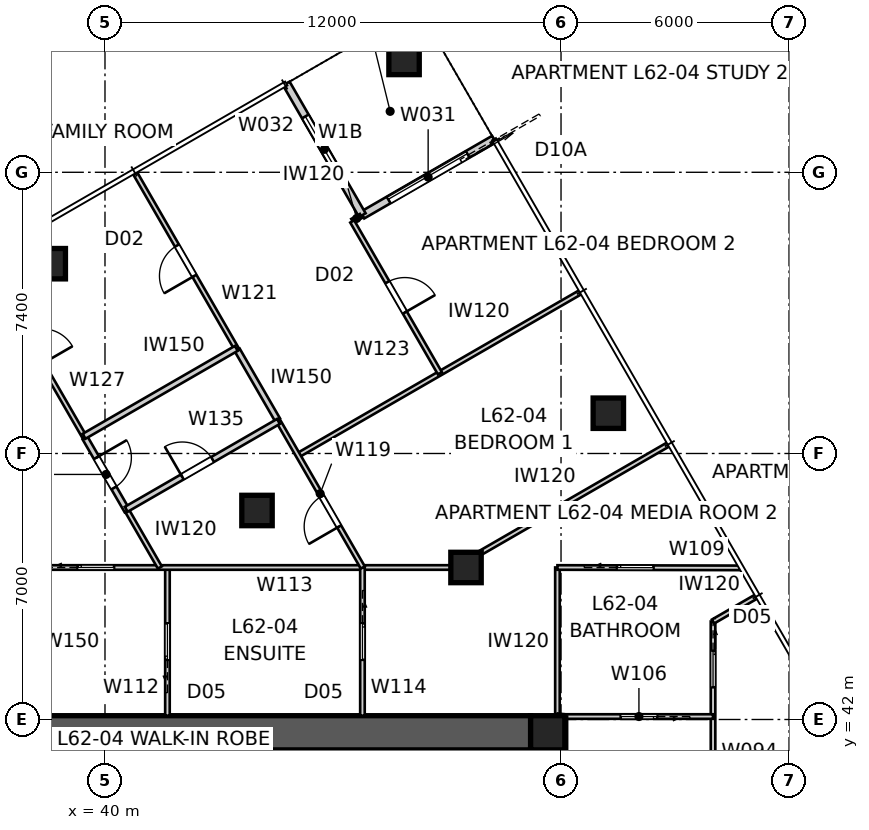
"""IFC4 building model, lengths in metres.
Left out: names, types, materials, properties, quantities, classifications, styles, units other than length and angle.
Written with IfcOpenShell. Run it as: python <this file> out.ifc"""

import sys

from ifc_helpers import new_model, si_unit, direction, frame, frame_2d, origin, origin_2d, place, context, subcontext, project, spatial, polyline, rectangle, outline, extrude, element, fill, save


model = new_model("IFC4")
c1 = context("Model", 3, precision=1e-05, world=origin(), true_north=direction((0.0, 1.0)))
c2 = subcontext(c1, "Body", "Model", "MODEL_VIEW")
j1 = project(units=[si_unit("LENGTHUNIT", "METRE"), si_unit("PLANEANGLEUNIT", "RADIAN")], contexts=[c1])
p1 = place(None, origin())
s1 = spatial("IfcSite", under=j1, at=p1, CompositionType="ELEMENT")
p2 = place(p1, origin())
s2 = spatial("IfcBuilding", under=s1, at=p2, CompositionType="ELEMENT")
p3 = place(p2, frame((0.0, 0.0, 225.2)))
s3 = spatial("IfcBuildingStorey", under=s2, at=p3, CompositionType="ELEMENT", Elevation=225.2)
p4 = place(p3, frame((28.8, 41.65, 0.0), z_axis=(0.0, 0.0, 1.0), x_axis=(1.0, 0.0, 0.0)))
e1 = element("IfcWall", 1, at=p4, inside=s3, PredefinedType="SHEAR", context=c2, shape_type="SweptSolid", body=[
    extrude(outline(polyline([(0.0, -0.45), (22.4, -0.45), (22.4, -0.025), (22.85, -0.025), (22.85, 0.025), (22.4, 0.025), (22.4, 0.45), (0.0, 0.45), (0.0, 0.025), (-0.45, 0.025), (-0.45, -0.025), (0.0, -0.025), (0.0, -0.45)])), origin(), (0.0, 0.0, 1.0), 3.4),
])
p5 = place(p3, frame((51.65, 18.8, 0.0), z_axis=(0.0, 0.0, 1.0), x_axis=(0.0, 1.0, 0.0)))
e2 = element("IfcWall", 2, at=p5, inside=s3, PredefinedType="SHEAR", context=c2, shape_type="SweptSolid", body=[
    extrude(outline(polyline([(0.0, -0.45), (22.4, -0.45), (22.4, -0.025), (22.85, -0.025), (22.85, 0.025), (22.4, 0.025), (22.4, 0.45), (0.0, 0.45), (0.0, 0.025), (-0.45, 0.025), (-0.45, -0.025), (0.0, -0.025), (0.0, -0.45)])), origin(), (0.0, 0.0, 1.0), 3.4),
])
p6 = place(p5, frame((11.14, 0.0, 0.0)))
e3 = element("IfcOpeningElement", 3, at=p6, cuts=e2, PredefinedType="OPENING", context=c2, shape_type="SweptSolid", body=[
    extrude(rectangle(XDim=1.02, YDim=2.4, at=frame_2d((0.51, 1.2))), frame((0.0, 0.46, 0.0), z_axis=(0.0, -1.0, 0.0), x_axis=(1.0, 0.0, 0.0)), (0.0, 0.0, 1.0), 0.92),
])
p7 = place(p3, frame((51.65, 41.65, 0.0), z_axis=(0.0, 0.0, 1.0), x_axis=(1.0, 0.0, 0.0)))
e4 = element("IfcColumn", 4, at=p7, inside=s3, PredefinedType="COLUMN", context=c2, shape_type="SweptSolid", body=[
    extrude(rectangle(XDim=0.9, YDim=0.9, at=origin_2d()), origin(), (0.0, 0.0, 1.0), 3.4),
])
for number, where, z_axis, x_axis in (
    (5, (53.245, 50.06, 0.0), (0.0, 0.0, 1.0), (1.0, 0.0, 0.0)),
    (6, (47.87, 59.37, 0.0), (0.0, 0.0, 1.0), (1.0, 0.0, 0.0)),
    (7, (38.56, 53.995, 0.0), (0.0, 0.0, 1.0), (1.0, 0.0, 0.0)),
    (8, (49.5, 46.0, 0.0), (0.0, 0.0, 1.0), (1.0, 0.0, 0.0)),
    (9, (44.0, 47.5, 0.0), (0.0, 0.0, 1.0), (1.0, 0.0, 0.0)),
):
    element("IfcColumn", number, at=place(p3, frame(where, z_axis=z_axis, x_axis=x_axis)), inside=s3, PredefinedType="COLUMN", context=c2, shape_type="SweptSolid", body=[
        extrude(rectangle(XDim=0.8, YDim=0.8, at=origin_2d()), origin(), (0.0, 0.0, 1.0), 3.4),
    ])
p8 = place(p3, frame((50.236, 57.271, 0.0), z_axis=(0.0, 0.0, 1.0), x_axis=(-0.866026010844, -0.49999894854, 0.0)))
e10 = element("IfcWall", 10, at=p8, inside=s3, PredefinedType="SOLIDWALL", context=c2, shape_type="SweptSolid", body=[
    extrude(rectangle(XDim=4.0, YDim=0.2, at=frame_2d((2.0, 0.0))), origin(), (0.0, 0.0, 1.0), 3.25),
])
p9 = place(p8, frame((0.8, 0.0, 0.0)))
e11 = element("IfcOpeningElement", 11, at=p9, cuts=e10, PredefinedType="OPENING", context=c2, shape_type="SweptSolid", body=[
    extrude(rectangle(XDim=2.4, YDim=2.1, at=frame_2d((1.2, 1.05))), frame((0.0, 0.11, 0.0), z_axis=(0.0, -1.0, 0.0), x_axis=(1.0, 0.0, 0.0)), (0.0, 0.0, 1.0), 0.22),
])
p10 = place(p3, frame((46.771, 55.271, 0.0), z_axis=(0.0, 0.0, 1.0), x_axis=(-0.49999894854, 0.866026010844, 0.0)))
e12 = element("IfcWall", 12, at=p10, inside=s3, PredefinedType="SOLIDWALL", context=c2, shape_type="SweptSolid", body=[
    extrude(rectangle(XDim=4.0, YDim=0.2, at=frame_2d((2.0, 0.0))), origin(), (0.0, 0.0, 1.0), 3.25),
])
p11 = place(p10, frame((1.0, 0.0, 0.45)))
e13 = element("IfcOpeningElement", 13, at=p11, cuts=e12, PredefinedType="OPENING", context=c2, shape_type="SweptSolid", body=[
    extrude(rectangle(XDim=2.0, YDim=1.8, at=frame_2d((1.0, 0.9))), frame((0.0, 0.11, 0.0), z_axis=(0.0, -1.0, 0.0), x_axis=(1.0, 0.0, 0.0)), (0.0, 0.0, 1.0), 0.22),
])
p12 = place(p3, frame((59.486, 41.25, 0.0), z_axis=(0.0, 0.0, 1.0), x_axis=(-0.866020489494, -0.500008511703, 0.0)))
e14 = element("IfcWall", 14, at=p12, inside=s3, PredefinedType="PARTITIONING", context=c2, shape_type="SweptSolid", body=[
    extrude(rectangle(XDim=8.496, YDim=0.25, at=frame_2d((4.248, 0.0))), origin(), (0.0, 0.0, 1.0), 3.25),
])
p13 = place(p3, frame((47.6, 41.2, 0.0), z_axis=(0.0, 0.0, 1.0), x_axis=(0.0, -1.0, 0.0)))
e15 = element("IfcWall", 15, at=p13, inside=s3, PredefinedType="SOLIDWALL", context=c2, shape_type="SweptSolid", body=[
    extrude(rectangle(XDim=5.9, YDim=0.15, at=frame_2d((2.95, 0.0))), origin(), (0.0, 0.0, 1.0), 3.25),
])
p14 = place(p3, frame((56.0, 44.578, 0.0), z_axis=(0.0, 0.0, 1.0), x_axis=(0.0, -1.0, 0.0)))
e16 = element("IfcWall", 16, at=p14, inside=s3, PredefinedType="PARTITIONING", context=c2, shape_type="SweptSolid", body=[
    extrude(rectangle(XDim=10.681, YDim=0.12, at=frame_2d((5.34, 0.0))), origin(), (0.0, 0.0, 1.0), 2.55),
])
p15 = place(p14, frame((0.77, 0.0, 0.0)))
e17 = element("IfcOpeningElement", 17, at=p15, cuts=e16, PredefinedType="OPENING", context=c2, shape_type="SweptSolid", body=[
    extrude(rectangle(XDim=0.96, YDim=2.1, at=frame_2d((0.48, 1.05))), frame((0.0, 0.07, 0.0), z_axis=(0.0, -1.0, 0.0), x_axis=(1.0, 0.0, 0.0)), (0.0, 0.0, 1.0), 0.14),
])
p16 = place(p14, frame((7.379, 0.0, 0.0)))
e18 = element("IfcOpeningElement", 18, at=p16, cuts=e16, PredefinedType="OPENING", context=c2, shape_type="SweptSolid", body=[
    extrude(rectangle(XDim=0.96, YDim=2.1, at=frame_2d((0.48, 1.05))), frame((0.0, 0.07, 0.0), z_axis=(0.0, -1.0, 0.0), x_axis=(1.0, 0.0, 0.0)), (0.0, 0.0, 1.0), 0.14),
])
p17 = place(p3, frame((56.0, 42.078, 0.0), z_axis=(0.0, 0.0, 1.0), x_axis=(-1.0, 0.0, 0.0)))
e19 = element("IfcWall", 19, at=p17, inside=s3, PredefinedType="PARTITIONING", context=c2, shape_type="SweptSolid", body=[
    extrude(rectangle(XDim=3.9, YDim=0.12, at=frame_2d((1.95, 0.0))), origin(), (0.0, 0.0, 1.0), 3.25),
])
p18 = place(p17, frame((1.47, 0.0, 0.0)))
e20 = element("IfcOpeningElement", 20, at=p18, cuts=e19, PredefinedType="OPENING", context=c2, shape_type="SweptSolid", body=[
    extrude(rectangle(XDim=0.96, YDim=2.1, at=frame_2d((0.48, 1.05))), frame((0.0, 0.07, 0.0), z_axis=(0.0, -1.0, 0.0), x_axis=(1.0, 0.0, 0.0)), (0.0, 0.0, 1.0), 0.14),
])
p19 = place(p3, frame((51.906, 42.1, 0.0), z_axis=(0.0, 0.0, 1.0), x_axis=(0.0, 1.0, 0.0)))
e21 = element("IfcWall", 21, at=p19, inside=s3, PredefinedType="PARTITIONING", context=c2, shape_type="SweptSolid", body=[
    extrude(rectangle(XDim=3.9, YDim=0.12, at=frame_2d((1.95, 0.0))), origin(), (0.0, 0.0, 1.0), 3.25),
])
p20 = place(p3, frame((51.906, 46.0, 0.0), z_axis=(0.0, 0.0, 1.0), x_axis=(0.999997822794, -0.002086721841, 0.0)))
e22 = element("IfcWall", 22, at=p20, inside=s3, PredefinedType="PARTITIONING", context=c2, shape_type="SweptSolid", body=[
    extrude(rectangle(XDim=4.797, YDim=0.12, at=frame_2d((2.398, 0.0))), origin(), (0.0, 0.0, 1.0), 3.25),
])
p21 = place(p20, frame((1.567, 0.0, 0.0)))
e23 = element("IfcOpeningElement", 23, at=p21, cuts=e22, PredefinedType="OPENING", context=c2, shape_type="SweptSolid", body=[
    extrude(rectangle(XDim=0.96, YDim=2.1, at=frame_2d((0.48, 1.05))), frame((0.0, 0.07, 0.0), z_axis=(0.0, -1.0, 0.0), x_axis=(1.0, 0.0, 0.0)), (0.0, 0.0, 1.0), 0.14),
])
p22 = place(p3, frame((57.138, 45.235, 0.0), z_axis=(0.0, 0.0, 1.0), x_axis=(-0.866040225545, -0.499974327079, 0.0)))
e24 = element("IfcWall", 24, at=p22, inside=s3, PredefinedType="PARTITIONING", context=c2, shape_type="SweptSolid", body=[
    extrude(rectangle(XDim=1.314, YDim=0.12, at=frame_2d((0.657, 0.0))), origin(), (0.0, 0.0, 1.0), 3.25),
])
p23 = place(p3, frame((52.1, 41.18, 0.0), z_axis=(0.0, 0.0, 1.0), x_axis=(0.0, 1.0, 0.0)))
e25 = element("IfcWall", 25, at=p23, inside=s3, PredefinedType="PARTITIONING", context=c2, shape_type="SweptSolid", body=[
    extrude(rectangle(XDim=0.898, YDim=0.12, at=frame_2d((0.449, 0.0))), origin(), (0.0, 0.0, 1.0), 3.25),
])
p24 = place(p3, frame((41.644, 42.1, 0.0), z_axis=(0.0, 0.0, 1.0), x_axis=(0.0, 1.0, 0.0)))
e26 = element("IfcWall", 26, at=p24, inside=s3, PredefinedType="PARTITIONING", context=c2, shape_type="SweptSolid", body=[
    extrude(rectangle(XDim=3.9, YDim=0.12, at=frame_2d((1.95, 0.0))), origin(), (0.0, 0.0, 1.0), 3.25),
])
p25 = place(p24, frame((1.47, 0.0, 0.0)))
e27 = element("IfcOpeningElement", 27, at=p25, cuts=e26, PredefinedType="OPENING", context=c2, shape_type="SweptSolid", body=[
    extrude(rectangle(XDim=0.96, YDim=2.1, at=frame_2d((0.48, 1.05))), frame((0.0, 0.07, 0.0), z_axis=(0.0, -1.0, 0.0), x_axis=(1.0, 0.0, 0.0)), (0.0, 0.0, 1.0), 0.14),
])
p26 = place(p3, frame((38.017, 46.0, 0.0), z_axis=(0.0, 0.0, 1.0), x_axis=(1.0, 0.0, 0.0)))
e28 = element("IfcWall", 28, at=p26, inside=s3, PredefinedType="PARTITIONING", context=c2, shape_type="SweptSolid", body=[
    extrude(rectangle(XDim=11.196, YDim=0.12, at=frame_2d((5.598, 0.0))), origin(), (0.0, 0.0, 1.0), 3.25),
])
p27 = place(p26, frame((1.262, 0.0, 0.0)))
e29 = element("IfcOpeningElement", 29, at=p27, cuts=e28, PredefinedType="OPENING", context=c2, shape_type="SweptSolid", body=[
    extrude(rectangle(XDim=0.96, YDim=2.1, at=frame_2d((0.48, 1.05))), frame((0.0, 0.07, 0.0), z_axis=(0.0, -1.0, 0.0), x_axis=(1.0, 0.0, 0.0)), (0.0, 0.0, 1.0), 0.14),
])
p28 = place(p3, frame((46.775, 46.0, 0.0), z_axis=(0.0, 0.0, 1.0), x_axis=(0.0, -1.0, 0.0)))
e30 = element("IfcWall", 30, at=p28, inside=s3, PredefinedType="PARTITIONING", context=c2, shape_type="SweptSolid", body=[
    extrude(rectangle(XDim=3.9, YDim=0.12, at=frame_2d((1.95, 0.0))), origin(), (0.0, 0.0, 1.0), 3.25),
])
p29 = place(p28, frame((1.47, 0.0, 0.0)))
e31 = element("IfcOpeningElement", 31, at=p29, cuts=e30, PredefinedType="OPENING", context=c2, shape_type="SweptSolid", body=[
    extrude(rectangle(XDim=0.96, YDim=2.1, at=frame_2d((0.48, 1.05))), frame((0.0, 0.07, 0.0), z_axis=(0.0, -1.0, 0.0), x_axis=(1.0, 0.0, 0.0)), (0.0, 0.0, 1.0), 0.14),
])
p30 = place(p3, frame((45.079, 48.954, 0.0), z_axis=(0.0, 0.0, 1.0), x_axis=(0.866025991751, 0.49999898161, 0.0)))
e32 = element("IfcWall", 32, at=p30, inside=s3, PredefinedType="PARTITIONING", context=c2, shape_type="SweptSolid", body=[
    extrude(rectangle(XDim=8.585, YDim=0.12, at=frame_2d((4.292, 0.0))), origin(), (0.0, 0.0, 1.0), 3.25),
])
p31 = place(p3, frame((46.784, 46.0, 0.0), z_axis=(0.0, 0.0, 1.0), x_axis=(-0.500017500808, 0.866015299452, 0.0)))
e33 = element("IfcWall", 33, at=p31, inside=s3, PredefinedType="PARTITIONING", context=c2, shape_type="SweptSolid", body=[
    extrude(rectangle(XDim=4.489, YDim=0.12, at=frame_2d((2.244, 0.0))), origin(), (0.0, 0.0, 1.0), 3.25),
])
p32 = place(p31, frame((1.245, 0.0, 0.0)))
e34 = element("IfcOpeningElement", 34, at=p32, cuts=e33, PredefinedType="OPENING", context=c2, shape_type="SweptSolid", body=[
    extrude(rectangle(XDim=0.92, YDim=2.34, at=frame_2d((0.46, 1.17))), frame((0.0, 0.07, 0.0), z_axis=(0.0, -1.0, 0.0), x_axis=(1.0, 0.0, 0.0)), (0.0, 0.0, 1.0), 0.14),
])
p33 = place(p3, frame((54.826, 49.241, 0.0), z_axis=(0.0, 0.0, 1.0), x_axis=(-0.866023120914, -0.500003954026, 0.0)))
e35 = element("IfcWall", 35, at=p33, inside=s3, PredefinedType="PARTITIONING", context=c2, shape_type="SweptSolid", body=[
    extrude(rectangle(XDim=6.481, YDim=0.12, at=frame_2d((3.241, 0.0))), origin(), (0.0, 0.0, 1.0), 3.25),
])
p34 = place(p3, frame((43.48, 51.722, 0.0), z_axis=(0.0, 0.0, 1.0), x_axis=(-0.499989180974, 0.866031650062, 0.0)))
e36 = element("IfcWall", 36, at=p34, inside=s3, PredefinedType="PARTITIONING", context=c2, shape_type="SweptSolid", body=[
    extrude(rectangle(XDim=5.388, YDim=0.12, at=frame_2d((2.694, 0.0))), origin(), (0.0, 0.0, 1.0), 3.25),
])
p35 = place(p34, frame((2.254, 0.0, 0.0)))
e37 = element("IfcOpeningElement", 37, at=p35, cuts=e36, PredefinedType="OPENING", context=c2, shape_type="SweptSolid", body=[
    extrude(rectangle(XDim=0.92, YDim=2.34, at=frame_2d((0.46, 1.17))), frame((0.0, 0.07, 0.0), z_axis=(0.0, -1.0, 0.0), x_axis=(1.0, 0.0, 0.0)), (0.0, 0.0, 1.0), 0.14),
])
p36 = place(p3, frame((46.737, 55.251, 0.0), z_axis=(0.0, 0.0, 1.0), x_axis=(-0.865829262097, -0.500339573586, 0.0)))
e38 = element("IfcWall", 38, at=p36, inside=s3, PredefinedType="PARTITIONING", context=c2, shape_type="SweptSolid", body=[
    extrude(rectangle(XDim=0.262, YDim=0.12, at=frame_2d((0.131, 0.0))), origin(), (0.0, 0.0, 1.0), 3.25),
])
p37 = place(p3, frame((46.506, 55.107, 0.0), z_axis=(0.0, 0.0, 1.0), x_axis=(0.49996820914, -0.866043757468, 0.0)))
e39 = element("IfcWall", 39, at=p37, inside=s3, PredefinedType="PARTITIONING", context=c2, shape_type="SweptSolid", body=[
    extrude(rectangle(XDim=4.615, YDim=0.12, at=frame_2d((2.308, 0.0))), origin(), (0.0, 0.0, 1.0), 3.25),
])
p38 = place(p37, frame((1.847, 0.0, 0.0)))
e40 = element("IfcOpeningElement", 40, at=p38, cuts=e39, PredefinedType="OPENING", context=c2, shape_type="SweptSolid", body=[
    extrude(rectangle(XDim=0.92, YDim=2.34, at=frame_2d((0.46, 1.17))), frame((0.0, 0.07, 0.0), z_axis=(0.0, -1.0, 0.0), x_axis=(1.0, 0.0, 0.0)), (0.0, 0.0, 1.0), 0.14),
])
p39 = place(p3, frame((44.54, 49.887, 0.0), z_axis=(0.0, 0.0, 1.0), x_axis=(-0.500005013853, 0.866022509016, 0.0)))
e41 = element("IfcWall", 41, at=p39, inside=s3, PredefinedType="SOLIDWALL", context=c2, shape_type="SweptSolid", body=[
    extrude(rectangle(XDim=2.119, YDim=0.15, at=frame_2d((1.06, 0.0))), origin(), (0.0, 0.0, 1.0), 3.25),
])
p40 = place(p3, frame((36.781, 54.076, 0.0), z_axis=(0.0, 0.0, 1.0), x_axis=(0.499989180974, -0.866031650062, 0.0)))
e42 = element("IfcWall", 42, at=p40, inside=s3, PredefinedType="PARTITIONING", context=c2, shape_type="SweptSolid", body=[
    extrude(rectangle(XDim=5.388, YDim=0.12, at=frame_2d((2.694, 0.0))), origin(), (0.0, 0.0, 1.0), 3.25),
])
p41 = place(p40, frame((2.214, 0.0, 0.0)))
e43 = element("IfcOpeningElement", 43, at=p41, cuts=e42, PredefinedType="OPENING", context=c2, shape_type="SweptSolid", body=[
    extrude(rectangle(XDim=0.92, YDim=2.34, at=frame_2d((0.46, 1.17))), frame((0.0, 0.07, 0.0), z_axis=(0.0, -1.0, 0.0), x_axis=(1.0, 0.0, 0.0)), (0.0, 0.0, 1.0), 0.14),
])
p42 = place(p3, frame((40.584, 47.488, 0.0), z_axis=(0.0, 0.0, 1.0), x_axis=(0.500005339912, -0.866022320763, 0.0)))
e44 = element("IfcWall", 44, at=p42, inside=s3, PredefinedType="PARTITIONING", context=c2, shape_type="SweptSolid", body=[
    extrude(rectangle(XDim=1.718, YDim=0.12, at=frame_2d((0.859, 0.0))), origin(), (0.0, 0.0, 1.0), 3.25),
])
p43 = place(p3, frame((39.475, 49.41, 0.0), z_axis=(0.0, 0.0, 1.0), x_axis=(0.500008142102, -0.866020702889, 0.0)))
e45 = element("IfcWall", 45, at=p43, inside=s3, PredefinedType="SOLIDWALL", context=c2, shape_type="SweptSolid", body=[
    extrude(rectangle(XDim=2.219, YDim=0.15, at=frame_2d((1.11, 0.0))), origin(), (0.0, 0.0, 1.0), 3.25),
])
p44 = place(p43, frame((0.6, 0.0, 0.0)))
e46 = element("IfcOpeningElement", 46, at=p44, cuts=e45, PredefinedType="OPENING", context=c2, shape_type="SweptSolid", body=[
    extrude(rectangle(XDim=0.92, YDim=2.34, at=frame_2d((0.46, 1.17))), frame((0.0, 0.085, 0.0), z_axis=(0.0, -1.0, 0.0), x_axis=(1.0, 0.0, 0.0)), (0.0, 0.0, 1.0), 0.17),
])
p45 = place(p3, frame((43.455, 51.766, 0.0), z_axis=(0.0, 0.0, 1.0), x_axis=(-0.866025598446, -0.499999662836, 0.0)))
e47 = element("IfcWall", 47, at=p45, inside=s3, PredefinedType="SOLIDWALL", context=c2, shape_type="SweptSolid", body=[
    extrude(rectangle(XDim=4.625, YDim=0.15, at=frame_2d((2.312, 0.0))), origin(), (0.0, 0.0, 1.0), 3.25),
])
p46 = place(p3, frame((40.559, 47.531, 0.0), z_axis=(0.0, 0.0, 1.0), x_axis=(0.866025598446, 0.499999662836, 0.0)))
e48 = element("IfcWall", 48, at=p46, inside=s3, PredefinedType="SOLIDWALL", context=c2, shape_type="SweptSolid", body=[
    extrude(rectangle(XDim=4.625, YDim=0.15, at=frame_2d((2.312, 0.0))), origin(), (0.0, 0.0, 1.0), 3.25),
])
p47 = place(p46, frame((1.702, 0.0, 0.0)))
e49 = element("IfcOpeningElement", 49, at=p47, cuts=e48, PredefinedType="OPENING", context=c2, shape_type="SweptSolid", body=[
    extrude(rectangle(XDim=0.92, YDim=2.34, at=frame_2d((0.46, 1.17))), frame((0.0, 0.085, 0.0), z_axis=(0.0, -1.0, 0.0), x_axis=(1.0, 0.0, 0.0)), (0.0, 0.0, 1.0), 0.17),
])
p48 = place(p3, frame((51.906, 42.1, 0.0), z_axis=(0.0, 0.0, 1.0), x_axis=(0.993387055489, -0.114813579278, 0.0)))
e50 = element("IfcWall", 50, at=p48, inside=s3, PredefinedType="PARTITIONING", context=c2, shape_type="SweptSolid", body=[
    extrude(rectangle(XDim=0.196, YDim=0.12, at=frame_2d((0.098, 0.0))), origin(), (0.0, 0.0, 1.0), 3.25),
])
p49 = place(p9, origin())
e51 = element("IfcDoor", 51, at=p49, inside=s3, OperationType="SLIDING_TO_LEFT", PredefinedType="DOOR", context=c2, shape_type="SweptSolid", body=[
    extrude(rectangle(XDim=2.4, YDim=2.1, at=frame_2d((1.2, 1.05))), frame((0.0, 0.025, 0.0), z_axis=(0.0, -1.0, 0.0), x_axis=(1.0, 0.0, 0.0)), (0.0, 0.0, 1.0), 0.05),
])
fill(e11, e51)
p50 = place(p11, origin())
e52 = element("IfcWindow", 52, at=p50, inside=s3, PartitioningType="SINGLE_PANEL", PredefinedType="WINDOW", context=c2, shape_type="SweptSolid", body=[
    extrude(rectangle(XDim=2.0, YDim=1.8, at=frame_2d((1.0, 0.9))), frame((0.0, 0.03, 0.0), z_axis=(0.0, -1.0, 0.0), x_axis=(1.0, 0.0, 0.0)), (0.0, 0.0, 1.0), 0.06),
])
fill(e13, e52)
p51 = place(p27, origin())
e53 = element("IfcDoor", 53, at=p51, inside=s3, OperationType="SLIDING_TO_LEFT", PredefinedType="DOOR", context=c2, shape_type="SweptSolid", body=[
    extrude(rectangle(XDim=0.96, YDim=2.1, at=frame_2d((0.48, 1.05))), frame((0.0, 0.025, 0.0), z_axis=(0.0, -1.0, 0.0), x_axis=(1.0, 0.0, 0.0)), (0.0, 0.0, 1.0), 0.05),
])
fill(e29, e53)
p52 = place(p44, origin())
e54 = element("IfcDoor", 54, at=p52, inside=s3, OperationType="SINGLE_SWING_LEFT", PredefinedType="DOOR", context=c2, shape_type="SweptSolid", body=[
    extrude(rectangle(XDim=0.92, YDim=2.34, at=frame_2d((0.46, 1.17))), frame((0.0, 0.025, 0.0), z_axis=(0.0, -1.0, 0.0), x_axis=(1.0, 0.0, 0.0)), (0.0, 0.0, 1.0), 0.05),
])
fill(e46, e54)
p53 = place(p35, origin())
e55 = element("IfcDoor", 55, at=p53, inside=s3, OperationType="SINGLE_SWING_LEFT", PredefinedType="DOOR", context=c2, shape_type="SweptSolid", body=[
    extrude(rectangle(XDim=0.92, YDim=2.34, at=frame_2d((0.46, 1.17))), frame((0.0, 0.025, 0.0), z_axis=(0.0, -1.0, 0.0), x_axis=(1.0, 0.0, 0.0)), (0.0, 0.0, 1.0), 0.05),
])
fill(e37, e55)
p54 = place(p25, origin())
e56 = element("IfcDoor", 56, at=p54, inside=s3, OperationType="SLIDING_TO_LEFT", PredefinedType="DOOR", context=c2, shape_type="SweptSolid", body=[
    extrude(rectangle(XDim=0.96, YDim=2.1, at=frame_2d((0.48, 1.05))), frame((0.0, 0.025, 0.0), z_axis=(0.0, -1.0, 0.0), x_axis=(1.0, 0.0, 0.0)), (0.0, 0.0, 1.0), 0.05),
])
fill(e27, e56)
p55 = place(p47, origin())
e57 = element("IfcDoor", 57, at=p55, inside=s3, OperationType="SINGLE_SWING_LEFT", PredefinedType="DOOR", context=c2, shape_type="SweptSolid", body=[
    extrude(rectangle(XDim=0.92, YDim=2.34, at=frame_2d((0.46, 1.17))), frame((0.0, 0.025, 0.0), z_axis=(0.0, -1.0, 0.0), x_axis=(1.0, 0.0, 0.0)), (0.0, 0.0, 1.0), 0.05),
])
fill(e49, e57)
p56 = place(p29, origin())
e58 = element("IfcDoor", 58, at=p56, inside=s3, OperationType="SLIDING_TO_LEFT", PredefinedType="DOOR", context=c2, shape_type="SweptSolid", body=[
    extrude(rectangle(XDim=0.96, YDim=2.1, at=frame_2d((0.48, 1.05))), frame((0.0, 0.025, 0.0), z_axis=(0.0, -1.0, 0.0), x_axis=(1.0, 0.0, 0.0)), (0.0, 0.0, 1.0), 0.05),
])
fill(e31, e58)
p57 = place(p32, origin())
e59 = element("IfcDoor", 59, at=p57, inside=s3, OperationType="SINGLE_SWING_LEFT", PredefinedType="DOOR", context=c2, shape_type="SweptSolid", body=[
    extrude(rectangle(XDim=0.92, YDim=2.34, at=frame_2d((0.46, 1.17))), frame((0.0, 0.025, 0.0), z_axis=(0.0, -1.0, 0.0), x_axis=(1.0, 0.0, 0.0)), (0.0, 0.0, 1.0), 0.05),
])
fill(e34, e59)
p58 = place(p21, origin())
e60 = element("IfcDoor", 60, at=p58, inside=s3, OperationType="SLIDING_TO_LEFT", PredefinedType="DOOR", context=c2, shape_type="SweptSolid", body=[
    extrude(rectangle(XDim=0.96, YDim=2.1, at=frame_2d((0.48, 1.05))), frame((0.0, 0.025, 0.0), z_axis=(0.0, -1.0, 0.0), x_axis=(1.0, 0.0, 0.0)), (0.0, 0.0, 1.0), 0.05),
])
fill(e23, e60)
p59 = place(p18, origin())
e61 = element("IfcDoor", 61, at=p59, inside=s3, OperationType="SLIDING_TO_LEFT", PredefinedType="DOOR", context=c2, shape_type="SweptSolid", body=[
    extrude(rectangle(XDim=0.96, YDim=2.1, at=frame_2d((0.48, 1.05))), frame((0.0, 0.025, 0.0), z_axis=(0.0, -1.0, 0.0), x_axis=(1.0, 0.0, 0.0)), (0.0, 0.0, 1.0), 0.05),
])
fill(e20, e61)
p60 = place(p15, origin())
e62 = element("IfcDoor", 62, at=p60, inside=s3, OperationType="SLIDING_TO_LEFT", PredefinedType="DOOR", context=c2, shape_type="SweptSolid", body=[
    extrude(rectangle(XDim=0.96, YDim=2.1, at=frame_2d((0.48, 1.05))), frame((0.0, 0.025, 0.0), z_axis=(0.0, -1.0, 0.0), x_axis=(1.0, 0.0, 0.0)), (0.0, 0.0, 1.0), 0.05),
])
fill(e17, e62)
p61 = place(p38, origin())
e63 = element("IfcDoor", 63, at=p61, inside=s3, OperationType="SINGLE_SWING_RIGHT", PredefinedType="DOOR", context=c2, shape_type="SweptSolid", body=[
    extrude(rectangle(XDim=0.92, YDim=2.34, at=frame_2d((0.46, 1.17))), frame((0.0, 0.025, 0.0), z_axis=(0.0, -1.0, 0.0), x_axis=(1.0, 0.0, 0.0)), (0.0, 0.0, 1.0), 0.05),
])
fill(e40, e63)
save(model, sys.argv[1])
